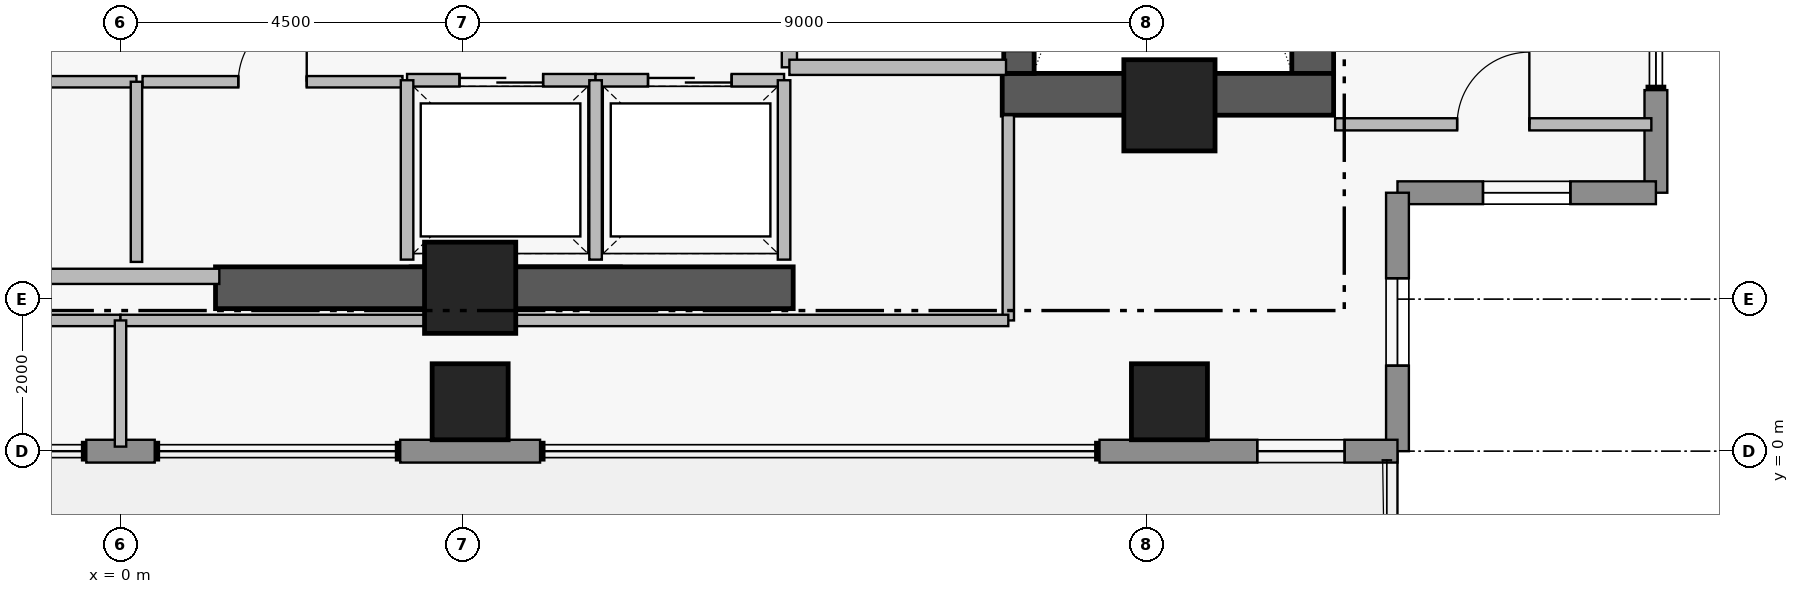
"""IFC4 building model, lengths in metres.
Left out: names, types, materials, properties, quantities, classifications, styles, units other than length and angle.
Written with IfcOpenShell. Run it as: python <this file> out.ifc"""

import sys

from ifc_helpers import new_model, si_unit, direction, frame, frame_2d, origin, origin_2d, place, context, subcontext, project, spatial, rectangle, extrude, element, fill, save


model = new_model("IFC4")
c1 = context("Model", 3, precision=1e-05, world=origin(), true_north=direction((0.0, 1.0)))
c2 = subcontext(c1, "Body", "Model", "MODEL_VIEW")
j1 = project(units=[si_unit("LENGTHUNIT", "METRE"), si_unit("PLANEANGLEUNIT", "RADIAN")], contexts=[c1])
p1 = place(None, origin())
s1 = spatial("IfcSite", under=j1, at=p1, CompositionType="ELEMENT")
p2 = place(p1, origin())
s2 = spatial("IfcBuilding", under=s1, at=p2, CompositionType="ELEMENT")
p3 = place(p2, frame((0.0, 0.0, 239.65)))
s3 = spatial("IfcBuildingStorey", under=s2, at=p3, CompositionType="ELEMENT", Elevation=239.65)
p4 = place(p3, frame((15.685, 4.97, 0.0), z_axis=(0.0, 0.0, 1.0), x_axis=(0.0, 1.0, 0.0)))
e1 = element("IfcWall", 1, at=p4, inside=s3, PredefinedType="SHEAR", context=c2, shape_type="SweptSolid", body=[
    extrude(rectangle(XDim=8.96, YDim=0.55, at=frame_2d((4.48, 0.0))), origin(), (0.0, 0.0, 1.0), 3.51),
])
p5 = place(p3, frame((11.6, 4.695, 0.0), z_axis=(0.0, 0.0, 1.0), x_axis=(1.0, 0.0, 0.0)))
e2 = element("IfcWall", 2, at=p5, inside=s3, PredefinedType="SHEAR", context=c2, shape_type="SweptSolid", body=[
    extrude(rectangle(XDim=4.36, YDim=0.55, at=frame_2d((2.18, 0.0))), origin(), (0.0, 0.0, 1.0), 3.51),
])
p6 = place(p3, frame((1.25, 2.15, 0.0), z_axis=(0.0, 0.0, 1.0), x_axis=(1.0, 0.0, 0.0)))
e3 = element("IfcWall", 3, at=p6, inside=s3, PredefinedType="SHEAR", context=c2, shape_type="SweptSolid", body=[
    extrude(rectangle(XDim=7.6, YDim=0.55, at=frame_2d((3.8, 0.0))), origin(), (0.0, 0.0, 1.0), 3.48),
])
p7 = place(p3, frame((11.82, 13.93, 0.0), z_axis=(0.0, 0.0, 1.0), x_axis=(0.0, -1.0, 0.0)))
e4 = element("IfcWall", 4, at=p7, inside=s3, PredefinedType="SHEAR", context=c2, shape_type="SweptSolid", body=[
    extrude(rectangle(XDim=8.96, YDim=0.4, at=frame_2d((4.48, 0.0))), origin(), (0.0, 0.0, 1.0), 3.51),
])
p8 = place(p7, frame((7.53, 0.0, 0.0)))
e5 = element("IfcOpeningElement", 5, at=p8, cuts=e4, PredefinedType="OPENING", context=c2, shape_type="SweptSolid", body=[
    extrude(rectangle(XDim=1.12, YDim=2.22, at=frame_2d((0.56, 1.11))), frame((0.0, 0.21, 0.0), z_axis=(0.0, -1.0, 0.0), x_axis=(1.0, 0.0, 0.0)), (0.0, 0.0, 1.0), 0.42),
])
for number, where, z_axis, x_axis in (
    (6, (4.6, 2.15, 0.0), (0.0, 0.0, 1.0), (1.0, 0.0, 0.0)),
    (7, (13.8, 4.55, 0.0), (0.0, 0.0, 1.0), (1.0, 0.0, 0.0)),
):
    element("IfcColumn", number, at=place(p3, frame(where, z_axis=z_axis, x_axis=x_axis)), inside=s3, PredefinedType="COLUMN", context=c2, shape_type="SweptSolid", body=[
        extrude(rectangle(XDim=1.2, YDim=1.2, at=origin_2d()), origin(), (0.0, 0.0, 1.0), 3.7),
    ])
for number, where, z_axis, x_axis in (
    (8, (4.6, 0.65, 0.43), (0.0, 0.0, 1.0), (1.0, 0.0, 0.0)),
    (9, (13.8, 0.65, 0.43), (0.0, 0.0, 1.0), (1.0, 0.0, 0.0)),
):
    element("IfcColumn", number, at=place(p3, frame(where, z_axis=z_axis, x_axis=x_axis)), inside=s3, PredefinedType="COLUMN", context=c2, shape_type="SweptSolid", body=[
        extrude(rectangle(XDim=1.0, YDim=1.0, at=origin_2d()), origin(), (0.0, 0.0, 1.0), 3.27),
    ])
p9 = place(p3, frame((20.2, 4.75, 0.0), z_axis=(0.0, 0.0, 1.0), x_axis=(0.0, -1.0, 0.0)))
e10 = element("IfcWall", 10, at=p9, inside=s3, PredefinedType="STANDARD", context=c2, shape_type="SweptSolid", body=[
    extrude(rectangle(XDim=1.35, YDim=0.3, at=frame_2d((0.675, 0.0))), origin(), (0.0, 0.0, 1.0), 3.48),
])
p10 = place(p3, frame((20.2, 3.4, 0.0), z_axis=(0.0, 0.0, 1.0), x_axis=(-1.0, 0.0, 0.0)))
e11 = element("IfcWall", 11, at=p10, inside=s3, PredefinedType="STANDARD", context=c2, shape_type="SweptSolid", body=[
    extrude(rectangle(XDim=3.4, YDim=0.3, at=frame_2d((1.7, 0.0))), origin(), (0.0, 0.0, 1.0), 3.48),
])
p11 = place(p10, frame((1.125, 0.0, 1.25)))
e12 = element("IfcOpeningElement", 12, at=p11, cuts=e11, PredefinedType="OPENING", context=c2, shape_type="SweptSolid", body=[
    extrude(rectangle(XDim=1.15, YDim=1.55, at=frame_2d((0.575, 0.775))), frame((0.0, 0.16, 0.0), z_axis=(0.0, -1.0, 0.0), x_axis=(1.0, 0.0, 0.0)), (0.0, 0.0, 1.0), 0.32),
])
p12 = place(p3, frame((16.8, 3.4, 0.0), z_axis=(0.0, 0.0, 1.0), x_axis=(0.0, -1.0, 0.0)))
e13 = element("IfcWall", 13, at=p12, inside=s3, PredefinedType="STANDARD", context=c2, shape_type="SweptSolid", body=[
    extrude(rectangle(XDim=3.4, YDim=0.3, at=frame_2d((1.7, 0.0))), origin(), (0.0, 0.0, 1.0), 3.48),
])
p13 = place(p12, frame((1.125, 0.0, 1.25)))
e14 = element("IfcOpeningElement", 14, at=p13, cuts=e13, PredefinedType="OPENING", context=c2, shape_type="SweptSolid", body=[
    extrude(rectangle(XDim=1.15, YDim=1.55, at=frame_2d((0.575, 0.775))), frame((0.0, 0.16, 0.0), z_axis=(0.0, -1.0, 0.0), x_axis=(1.0, 0.0, 0.0)), (0.0, 0.0, 1.0), 0.32),
])
p14 = place(p3, frame((16.8, 0.0, 0.0), z_axis=(0.0, 0.0, 1.0), x_axis=(-1.0, 0.0, 0.0)))
e15 = element("IfcWall", 15, at=p14, inside=s3, PredefinedType="STANDARD", context=c2, shape_type="SweptSolid", body=[
    extrude(rectangle(XDim=3.92, YDim=0.3, at=frame_2d((1.96, 0.0))), origin(), (0.0, 0.0, 1.0), 3.48),
])
p15 = place(p14, frame((0.695, 0.0, 0.95)))
e16 = element("IfcOpeningElement", 16, at=p15, cuts=e15, PredefinedType="OPENING", context=c2, shape_type="SweptSolid", body=[
    extrude(rectangle(XDim=1.15, YDim=1.55, at=frame_2d((0.575, 0.775))), frame((0.0, 0.16, 0.0), z_axis=(0.0, -1.0, 0.0), x_axis=(1.0, 0.0, 0.0)), (0.0, 0.0, 1.0), 0.32),
])
p16 = place(p3, frame((5.52, 0.0, 0.0), z_axis=(0.0, 0.0, 1.0), x_axis=(-1.0, 0.0, 0.0)))
e17 = element("IfcWall", 17, at=p16, inside=s3, PredefinedType="STANDARD", context=c2, shape_type="SweptSolid", body=[
    extrude(rectangle(XDim=1.84, YDim=0.3, at=frame_2d((0.92, 0.0))), origin(), (0.0, 0.0, 1.0), 3.48),
])
p17 = place(p3, frame((0.45, 0.0, 0.0), z_axis=(0.0, 0.0, 1.0), x_axis=(-1.0, 0.0, 0.0)))
e18 = element("IfcWall", 18, at=p17, inside=s3, PredefinedType="STANDARD", context=c2, shape_type="SweptSolid", body=[
    extrude(rectangle(XDim=0.9, YDim=0.3, at=frame_2d((0.45, 0.0))), origin(), (0.0, 0.0, 1.0), 3.48),
])
p18 = place(p3, frame((8.8, 11.15, 0.0), z_axis=(0.0, 0.0, 1.0), x_axis=(0.0, -1.0, 0.0)))
e19 = element("IfcWall", 19, at=p18, inside=s3, PredefinedType="PARTITIONING", context=c2, shape_type="SweptSolid", body=[
    extrude(rectangle(XDim=6.1, YDim=0.2, at=frame_2d((3.05, 0.0))), origin(), (0.0, 0.0, 1.0), 3.48),
])
p19 = place(p18, frame((1.15, 0.0, 0.0)))
e20 = element("IfcOpeningElement", 20, at=p19, cuts=e19, PredefinedType="OPENING", context=c2, shape_type="SweptSolid", body=[
    extrude(rectangle(XDim=1.1, YDim=2.2, at=frame_2d((0.55, 1.1))), frame((0.0, 0.11, 0.0), z_axis=(0.0, -1.0, 0.0), x_axis=(1.0, 0.0, 0.0)), (0.0, 0.0, 1.0), 0.22),
])
p20 = place(p18, frame((4.75, 0.0, 0.0)))
e21 = element("IfcOpeningElement", 21, at=p20, cuts=e19, PredefinedType="OPENING", context=c2, shape_type="SweptSolid", body=[
    extrude(rectangle(XDim=1.1, YDim=2.2, at=frame_2d((0.55, 1.1))), frame((0.0, 0.11, 0.0), z_axis=(0.0, -1.0, 0.0), x_axis=(1.0, 0.0, 0.0)), (0.0, 0.0, 1.0), 0.22),
])
p21 = place(p3, frame((3.77, 4.88, 0.0), z_axis=(0.0, 0.0, 1.0), x_axis=(1.0, 0.0, 0.0)))
e22 = element("IfcWall", 22, at=p21, inside=s3, PredefinedType="PARTITIONING", context=c2, shape_type="SweptSolid", body=[
    extrude(rectangle(XDim=2.48, YDim=0.165, at=frame_2d((1.24, 0.0))), origin(), (0.0, 0.0, 1.0), 3.48),
])
p22 = place(p21, frame((0.69, 0.0, 0.0)))
e23 = element("IfcOpeningElement", 23, at=p22, cuts=e22, PredefinedType="OPENING", context=c2, shape_type="SweptSolid", body=[
    extrude(rectangle(XDim=1.1, YDim=2.25, at=frame_2d((0.55, 1.125))), frame((0.0, 0.093, 0.0), z_axis=(0.0, -1.0, 0.0), x_axis=(1.0, 0.0, 0.0)), (0.0, 0.0, 1.0), 0.185),
])
p23 = place(p3, frame((6.25, 4.88, 0.0), z_axis=(0.0, 0.0, 1.0), x_axis=(1.0, 0.0, 0.0)))
e24 = element("IfcWall", 24, at=p23, inside=s3, PredefinedType="PARTITIONING", context=c2, shape_type="SweptSolid", body=[
    extrude(rectangle(XDim=2.48, YDim=0.165, at=frame_2d((1.24, 0.0))), origin(), (0.0, 0.0, 1.0), 3.48),
])
p24 = place(p23, frame((0.69, 0.0, 0.0)))
e25 = element("IfcOpeningElement", 25, at=p24, cuts=e24, PredefinedType="OPENING", context=c2, shape_type="SweptSolid", body=[
    extrude(rectangle(XDim=1.1, YDim=2.25, at=frame_2d((0.55, 1.125))), frame((0.0, 0.093, 0.0), z_axis=(0.0, -1.0, 0.0), x_axis=(1.0, 0.0, 0.0)), (0.0, 0.0, 1.0), 0.185),
])
p25 = place(p3, frame((-4.41, 4.86, 0.0), z_axis=(0.0, 0.0, 1.0), x_axis=(1.0, 0.0, 0.0)))
e26 = element("IfcWall", 26, at=p25, inside=s3, PredefinedType="PARTITIONING", context=c2, shape_type="SweptSolid", body=[
    extrude(rectangle(XDim=4.62, YDim=0.15, at=frame_2d((2.31, 0.0))), origin(), (0.0, 0.0, 1.0), 3.48),
])
p26 = place(p25, frame((1.86, 0.0, 0.0)))
e27 = element("IfcOpeningElement", 27, at=p26, cuts=e26, PredefinedType="OPENING", context=c2, shape_type="SweptSolid", body=[
    extrude(rectangle(XDim=0.9, YDim=2.15, at=frame_2d((0.45, 1.075))), frame((0.0, 0.085, 0.0), z_axis=(0.0, -1.0, 0.0), x_axis=(1.0, 0.0, 0.0)), (0.0, 0.0, 1.0), 0.17),
])
p27 = place(p3, frame((0.29, 4.86, 0.0), z_axis=(0.0, 0.0, 1.0), x_axis=(1.0, 0.0, 0.0)))
e28 = element("IfcWall", 28, at=p27, inside=s3, PredefinedType="PARTITIONING", context=c2, shape_type="SweptSolid", body=[
    extrude(rectangle(XDim=3.42, YDim=0.15, at=frame_2d((1.71, 0.0))), origin(), (0.0, 0.0, 1.0), 3.48),
])
p28 = place(p27, frame((1.26, 0.0, 0.0)))
e29 = element("IfcOpeningElement", 29, at=p28, cuts=e28, PredefinedType="OPENING", context=c2, shape_type="SweptSolid", body=[
    extrude(rectangle(XDim=0.9, YDim=2.15, at=frame_2d((0.45, 1.075))), frame((0.0, 0.085, 0.0), z_axis=(0.0, -1.0, 0.0), x_axis=(1.0, 0.0, 0.0)), (0.0, 0.0, 1.0), 0.17),
])
p29 = place(p3, frame((15.98, 4.3, 0.0), z_axis=(0.0, 0.0, 1.0), x_axis=(1.0, 0.0, 0.0)))
e30 = element("IfcWall", 30, at=p29, inside=s3, PredefinedType="PARTITIONING", context=c2, shape_type="SweptSolid", body=[
    extrude(rectangle(XDim=4.16, YDim=0.16, at=frame_2d((2.08, 0.0))), origin(), (0.0, 0.0, 1.0), 3.48),
])
p30 = place(p29, frame((1.605, 0.0, 0.0)))
e31 = element("IfcOpeningElement", 31, at=p30, cuts=e30, PredefinedType="OPENING", context=c2, shape_type="SweptSolid", body=[
    extrude(rectangle(XDim=0.95, YDim=2.15, at=frame_2d((0.475, 1.075))), frame((0.0, 0.09, 0.0), z_axis=(0.0, -1.0, 0.0), x_axis=(1.0, 0.0, 0.0)), (0.0, 0.0, 1.0), 0.18),
])
p31 = place(p3, frame((8.8, 5.05, 0.0), z_axis=(0.0, 0.0, 1.0), x_axis=(1.0, 0.0, 0.0)))
e32 = element("IfcWall", 32, at=p31, inside=s3, PredefinedType="PARTITIONING", context=c2, shape_type="SweptSolid", body=[
    extrude(rectangle(XDim=2.85, YDim=0.2, at=frame_2d((1.425, 0.0))), origin(), (0.0, 0.0, 1.0), 3.48),
])
for number, where, z_axis, x_axis in (
    (33, (3.77, 2.52, 0.0), (0.0, 0.0, 1.0), (0.0, 1.0, 0.0)),
    (34, (6.25, 2.52, 0.0), (0.0, 0.0, 1.0), (0.0, 1.0, 0.0)),
    (35, (8.73, 2.52, 0.0), (0.0, 0.0, 1.0), (0.0, 1.0, 0.0)),
):
    element("IfcWall", number, at=place(p3, frame(where, z_axis=z_axis, x_axis=x_axis)), inside=s3, PredefinedType="PARTITIONING", context=c2, shape_type="SweptSolid", body=[
        extrude(rectangle(XDim=2.36, YDim=0.165, at=frame_2d((1.18, 0.0))), origin(), (0.0, 0.0, 1.0), 3.48),
    ])
p32 = place(p3, frame((-1.3, 2.3, 0.0), z_axis=(0.0, 0.0, 1.0), x_axis=(1.0, 0.0, 0.0)))
e36 = element("IfcWall", 36, at=p32, inside=s3, PredefinedType="PARTITIONING", context=c2, shape_type="SweptSolid", body=[
    extrude(rectangle(XDim=2.6, YDim=0.2, at=frame_2d((1.3, 0.0))), origin(), (0.0, 0.0, 1.0), 2.38),
])
p33 = place(p3, frame((0.21, 2.49, 0.0), z_axis=(0.0, 0.0, 1.0), x_axis=(0.0, 1.0, 0.0)))
e37 = element("IfcWall", 37, at=p33, inside=s3, PredefinedType="PARTITIONING", context=c2, shape_type="SweptSolid", body=[
    extrude(rectangle(XDim=2.37, YDim=0.15, at=frame_2d((1.185, 0.0))), origin(), (0.0, 0.0, 1.0), 3.48),
])
p34 = place(p3, frame((-11.68, 1.72, 0.0), z_axis=(0.0, 0.0, 1.0), x_axis=(1.0, 0.0, 0.0)))
e38 = element("IfcWall", 38, at=p34, inside=s3, PredefinedType="PARTITIONING", context=c2, shape_type="SweptSolid", body=[
    extrude(rectangle(XDim=11.68, YDim=0.15, at=frame_2d((5.84, 0.0))), origin(), (0.0, 0.0, 1.0), 2.38),
])
p35 = place(p3, frame((11.68, 1.72, 0.0), z_axis=(0.0, 0.0, 1.0), x_axis=(0.0, 1.0, 0.0)))
e39 = element("IfcWall", 39, at=p35, inside=s3, PredefinedType="PARTITIONING", context=c2, shape_type="SweptSolid", body=[
    extrude(rectangle(XDim=2.7, YDim=0.15, at=frame_2d((1.35, 0.0))), origin(), (0.0, 0.0, 1.0), 3.48),
])
p36 = place(p3, frame((0.0, 1.72, 0.0), z_axis=(0.0, 0.0, 1.0), x_axis=(1.0, 0.0, 0.0)))
e40 = element("IfcWall", 40, at=p36, inside=s3, PredefinedType="PARTITIONING", context=c2, shape_type="SweptSolid", body=[
    extrude(rectangle(XDim=11.68, YDim=0.15, at=frame_2d((5.84, 0.0))), origin(), (0.0, 0.0, 1.0), 2.38),
])
p37 = place(p3, frame((0.0, 0.06, 0.0), z_axis=(0.0, 0.0, 1.0), x_axis=(0.0, 1.0, 0.0)))
e41 = element("IfcWall", 41, at=p37, inside=s3, PredefinedType="PARTITIONING", context=c2, shape_type="SweptSolid", body=[
    extrude(rectangle(XDim=1.66, YDim=0.15, at=frame_2d((0.83, 0.0))), origin(), (0.0, 0.0, 1.0), 3.48),
])
p38 = place(p11, origin())
e42 = element("IfcWindow", 42, at=p38, inside=s3, PartitioningType="SINGLE_PANEL", PredefinedType="WINDOW", context=c2, shape_type="SweptSolid", body=[
    extrude(rectangle(XDim=1.15, YDim=1.55, at=frame_2d((0.575, 0.775))), frame((0.0, 0.03, 0.0), z_axis=(0.0, -1.0, 0.0), x_axis=(1.0, 0.0, 0.0)), (0.0, 0.0, 1.0), 0.06),
])
fill(e12, e42)
p39 = place(p13, origin())
e43 = element("IfcWindow", 43, at=p39, inside=s3, PartitioningType="SINGLE_PANEL", PredefinedType="WINDOW", context=c2, shape_type="SweptSolid", body=[
    extrude(rectangle(XDim=1.15, YDim=1.55, at=frame_2d((0.575, 0.775))), frame((0.0, 0.03, 0.0), z_axis=(0.0, -1.0, 0.0), x_axis=(1.0, 0.0, 0.0)), (0.0, 0.0, 1.0), 0.06),
])
fill(e14, e43)
p40 = place(p15, origin())
e44 = element("IfcWindow", 44, at=p40, inside=s3, PartitioningType="SINGLE_PANEL", PredefinedType="WINDOW", context=c2, shape_type="SweptSolid", body=[
    extrude(rectangle(XDim=1.15, YDim=1.55, at=frame_2d((0.575, 0.775))), frame((0.0, 0.03, 0.0), z_axis=(0.0, -1.0, 0.0), x_axis=(1.0, 0.0, 0.0)), (0.0, 0.0, 1.0), 0.06),
])
fill(e16, e44)
p41 = place(p22, origin())
e45 = element("IfcDoor", 45, at=p41, inside=s3, OperationType="SLIDING_TO_LEFT", PredefinedType="DOOR", context=c2, shape_type="SweptSolid", body=[
    extrude(rectangle(XDim=1.1, YDim=2.25, at=frame_2d((0.55, 1.125))), frame((0.0, 0.025, 0.0), z_axis=(0.0, -1.0, 0.0), x_axis=(1.0, 0.0, 0.0)), (0.0, 0.0, 1.0), 0.05),
])
fill(e23, e45)
p42 = place(p24, origin())
e46 = element("IfcDoor", 46, at=p42, inside=s3, OperationType="SLIDING_TO_LEFT", PredefinedType="DOOR", context=c2, shape_type="SweptSolid", body=[
    extrude(rectangle(XDim=1.1, YDim=2.25, at=frame_2d((0.55, 1.125))), frame((0.0, 0.025, 0.0), z_axis=(0.0, -1.0, 0.0), x_axis=(1.0, 0.0, 0.0)), (0.0, 0.0, 1.0), 0.05),
])
fill(e25, e46)
p43 = place(p28, origin())
e47 = element("IfcDoor", 47, at=p43, inside=s3, OperationType="SINGLE_SWING_RIGHT", PredefinedType="DOOR", context=c2, shape_type="SweptSolid", body=[
    extrude(rectangle(XDim=0.9, YDim=2.15, at=frame_2d((0.45, 1.075))), frame((0.0, 0.025, 0.0), z_axis=(0.0, -1.0, 0.0), x_axis=(1.0, 0.0, 0.0)), (0.0, 0.0, 1.0), 0.05),
])
fill(e29, e47)
p44 = place(p30, origin())
e48 = element("IfcDoor", 48, at=p44, inside=s3, OperationType="SINGLE_SWING_RIGHT", PredefinedType="DOOR", context=c2, shape_type="SweptSolid", body=[
    extrude(rectangle(XDim=0.95, YDim=2.15, at=frame_2d((0.475, 1.075))), frame((0.0, 0.025, 0.0), z_axis=(0.0, -1.0, 0.0), x_axis=(1.0, 0.0, 0.0)), (0.0, 0.0, 1.0), 0.05),
])
fill(e31, e48)
save(model, sys.argv[1])
